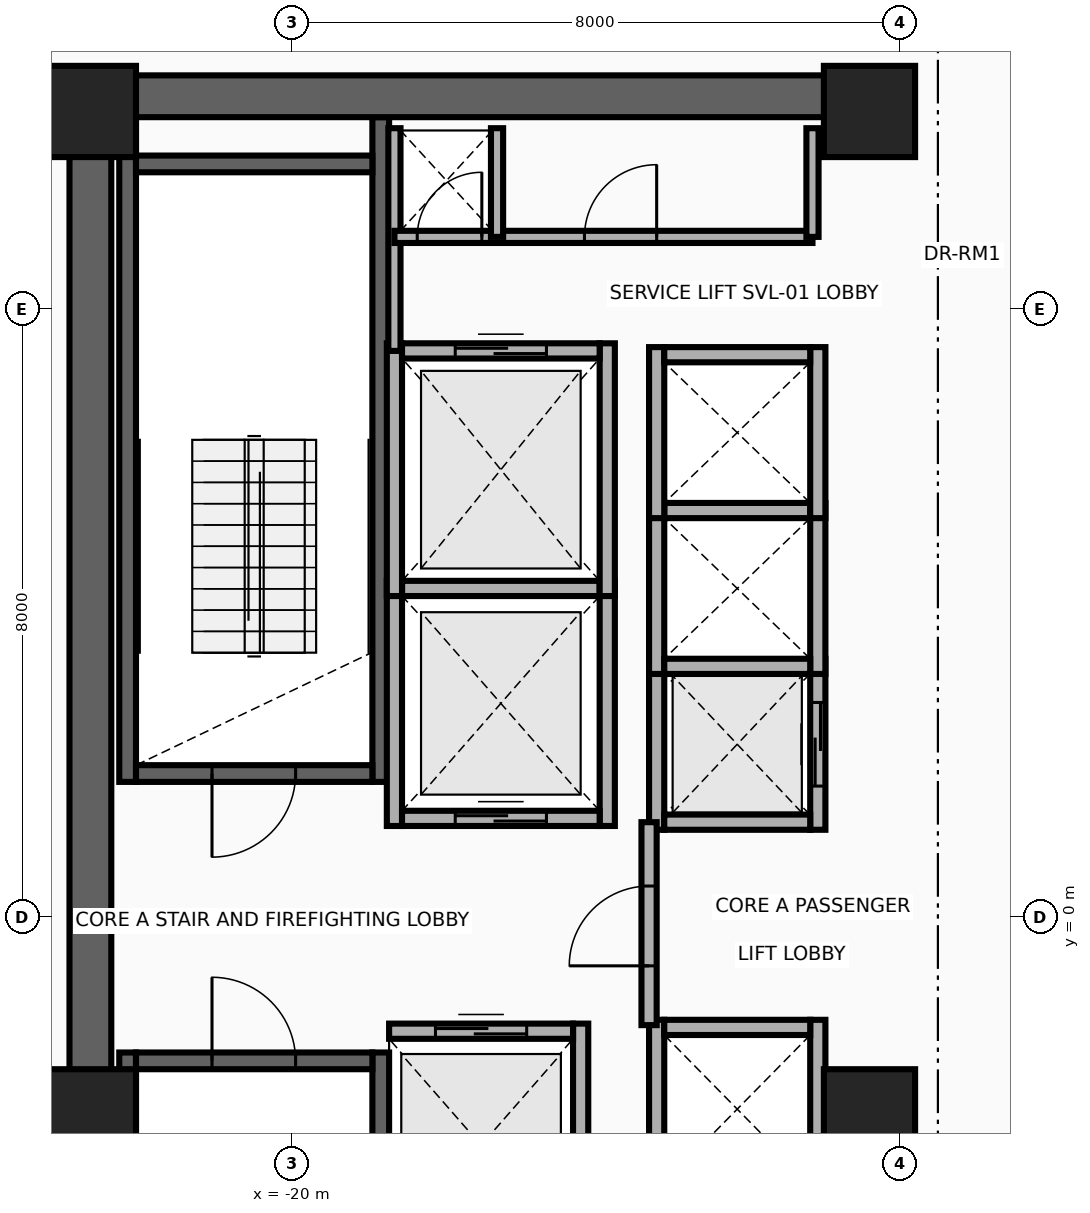
"""IFC4 building model, lengths in metres.
Left out: names, types, materials, properties, quantities, classifications, styles, units other than length and angle.
Written with IfcOpenShell. Run it as: python <this file> out.ifc"""

import sys

from ifc_helpers import new_model, si_unit, direction, frame, frame_2d, origin, origin_2d, place, context, subcontext, project, spatial, rectangle, extrude, source, transform, mapped, element, fill, save


model = new_model("IFC4")
c1 = context("Model", 3, precision=1e-05, world=origin(), true_north=direction((0.0, 1.0)))
c2 = subcontext(c1, "Body", "Model", "MODEL_VIEW")
j1 = project(units=[si_unit("LENGTHUNIT", "METRE"), si_unit("PLANEANGLEUNIT", "RADIAN")], contexts=[c1])
p1 = place(None, origin())
s1 = spatial("IfcSite", under=j1, at=p1, CompositionType="ELEMENT")
p2 = place(p1, origin())
s2 = spatial("IfcBuilding", under=s1, at=p2, CompositionType="ELEMENT")
p3 = place(p2, frame((0.0, 0.0, 157.5)))
s3 = spatial("IfcBuildingStorey", under=s2, at=p3, CompositionType="ELEMENT", Elevation=157.5)
for number, where, z_axis, x_axis in (
    (1, (-22.16, 1.78, 0.0), (0.0, 0.0, 1.0), (0.0, 1.0, 0.0)),
    (2, (-18.83, 1.78, 0.0), (0.0, 0.0, 1.0), (0.0, 1.0, 0.0)),
):
    element("IfcWall", number, at=place(p3, frame(where, z_axis=z_axis, x_axis=x_axis)), inside=s3, PredefinedType="SHEAR", context=c2, shape_type="SweptSolid", body=[
        extrude(rectangle(XDim=8.745, YDim=0.22, at=frame_2d((4.373, 0.0))), origin(), (0.0, 0.0, 1.0), 3.46),
    ])
p4 = place(p3, frame((-22.05, 1.89, 0.0), z_axis=(0.0, 0.0, 1.0), x_axis=(1.0, 0.0, 0.0)))
e3 = element("IfcWall", 3, at=p4, inside=s3, PredefinedType="SHEAR", context=c2, shape_type="SweptSolid", body=[
    extrude(rectangle(XDim=3.11, YDim=0.22, at=frame_2d((1.555, 0.0))), origin(), (0.0, 0.0, 1.0), 3.46),
])
p5 = place(p4, frame((1.0, 0.0, 0.0)))
e4 = element("IfcOpeningElement", 4, at=p5, cuts=e3, PredefinedType="OPENING", context=c2, shape_type="SweptSolid", body=[
    extrude(rectangle(XDim=1.1, YDim=2.15, at=frame_2d((0.55, 1.075))), frame((0.0, 0.125, 0.0), z_axis=(0.0, -1.0, 0.0), x_axis=(1.0, 0.0, 0.0)), (0.0, 0.0, 1.0), 0.25),
])
p6 = place(p3, frame((-22.05, 9.91, 0.0), z_axis=(0.0, 0.0, 1.0), x_axis=(1.0, 0.0, 0.0)))
e5 = element("IfcWall", 5, at=p6, inside=s3, PredefinedType="SHEAR", context=c2, shape_type="SweptSolid", body=[
    extrude(rectangle(XDim=3.11, YDim=0.22, at=frame_2d((1.555, 0.0))), origin(), (0.0, 0.0, 1.0), 3.46),
])
for number, where, z_axis, x_axis in (
    (6, (-22.16, -10.525, 0.0), (0.0, 0.0, 1.0), (0.0, 1.0, 0.0)),
    (7, (-18.83, -10.525, 0.0), (0.0, 0.0, 1.0), (0.0, 1.0, 0.0)),
):
    element("IfcWall", number, at=place(p3, frame(where, z_axis=z_axis, x_axis=x_axis)), inside=s3, PredefinedType="SHEAR", context=c2, shape_type="SweptSolid", body=[
        extrude(rectangle(XDim=8.745, YDim=0.22, at=frame_2d((4.373, 0.0))), origin(), (0.0, 0.0, 1.0), 3.46),
    ])
p7 = place(p3, frame((-22.05, -1.89, 0.0), z_axis=(0.0, 0.0, 1.0), x_axis=(1.0, 0.0, 0.0)))
e8 = element("IfcWall", 8, at=p7, inside=s3, PredefinedType="SHEAR", context=c2, shape_type="SweptSolid", body=[
    extrude(rectangle(XDim=3.11, YDim=0.22, at=frame_2d((1.555, 0.0))), origin(), (0.0, 0.0, 1.0), 3.46),
])
p8 = place(p7, frame((1.0, 0.0, 0.0)))
e9 = element("IfcOpeningElement", 9, at=p8, cuts=e8, PredefinedType="OPENING", context=c2, shape_type="SweptSolid", body=[
    extrude(rectangle(XDim=1.1, YDim=2.15, at=frame_2d((0.55, 1.075))), frame((0.0, 0.125, 0.0), z_axis=(0.0, -1.0, 0.0), x_axis=(1.0, 0.0, 0.0)), (0.0, 0.0, 1.0), 0.25),
])
p9 = place(p3, frame((-22.65, -11.075, 0.0), z_axis=(0.0, 0.0, 1.0), x_axis=(0.0, 1.0, 0.0)))
e10 = element("IfcWall", 10, at=p9, inside=s3, PredefinedType="SHEAR", context=c2, shape_type="SweptSolid", body=[
    extrude(rectangle(XDim=22.15, YDim=0.55, at=frame_2d((11.075, 0.0))), origin(), (0.0, 0.0, 1.0), 3.46),
])
p10 = place(p3, frame((-22.65, 10.8, 0.0), z_axis=(0.0, 0.0, 1.0), x_axis=(1.0, 0.0, 0.0)))
e11 = element("IfcWall", 11, at=p10, inside=s3, PredefinedType="SHEAR", context=c2, shape_type="SweptSolid", body=[
    extrude(rectangle(XDim=10.25, YDim=0.55, at=frame_2d((5.125, 0.0))), origin(), (0.0, 0.0, 1.0), 3.46),
])
m1 = source(origin(), c2, "Body", "SweptSolid", [
    extrude(rectangle(XDim=1.2, YDim=1.2, at=origin_2d()), origin(), (0.0, 0.0, 1.0), 3.7),
])
for number, where, z_axis, x_axis in (
    (12, (-22.65, -2.6, 0.0), (0.0, 0.0, 1.0), (1.0, 0.0, 0.0)),
    (13, (-12.4, -2.6, 0.0), (0.0, 0.0, 1.0), (1.0, 0.0, 0.0)),
    (14, (-22.65, 10.6, 0.0), (0.0, 0.0, 1.0), (1.0, 0.0, 0.0)),
    (15, (-12.4, 10.6, 0.0), (0.0, 0.0, 1.0), (1.0, 0.0, 0.0)),
):
    element("IfcColumn", number, at=place(p3, frame(where, z_axis=z_axis, x_axis=x_axis)), inside=s3, PredefinedType="COLUMN", context=c2, shape_type="MappedRepresentation", body=[
        mapped(m1, transform((0.0, 0.0, 0.0), x_axis=(1.0, 0.0, 0.0), y_axis=(0.0, 1.0, 0.0), z_axis=(0.0, 0.0, 1.0), scale=1.0)),
    ])
for number, where, z_axis, x_axis in (
    (16, (-18.65, 1.2, 0.0), (0.0, 0.0, 1.0), (0.0, 1.0, 0.0)),
    (17, (-15.85, 1.2, 0.0), (0.0, 0.0, 1.0), (0.0, 1.0, 0.0)),
):
    element("IfcWall", number, at=place(p3, frame(where, z_axis=z_axis, x_axis=x_axis)), inside=s3, PredefinedType="MOVABLE", context=c2, shape_type="SweptSolid", body=[
        extrude(rectangle(XDim=3.225, YDim=0.2, at=frame_2d((1.613, 0.0))), origin(), (0.0, 0.0, 1.0), 3.46),
    ])
p11 = place(p3, frame((-18.55, 1.3, 0.0), z_axis=(0.0, 0.0, 1.0), x_axis=(1.0, 0.0, 0.0)))
e18 = element("IfcWall", 18, at=p11, inside=s3, PredefinedType="MOVABLE", context=c2, shape_type="SweptSolid", body=[
    extrude(rectangle(XDim=2.6, YDim=0.2, at=frame_2d((1.3, 0.0))), origin(), (0.0, 0.0, 1.0), 3.46),
])
p12 = place(p11, frame((0.7, 0.0, 0.0)))
e19 = element("IfcOpeningElement", 19, at=p12, cuts=e18, PredefinedType="OPENING", context=c2, shape_type="SweptSolid", body=[
    extrude(rectangle(XDim=1.2, YDim=2.1, at=frame_2d((0.6, 1.05))), frame((0.0, 0.115, 0.0), z_axis=(0.0, -1.0, 0.0), x_axis=(1.0, 0.0, 0.0)), (0.0, 0.0, 1.0), 0.23),
])
p13 = place(p3, frame((-18.55, 4.325, 0.0), z_axis=(0.0, 0.0, 1.0), x_axis=(1.0, 0.0, 0.0)))
e20 = element("IfcWall", 20, at=p13, inside=s3, PredefinedType="MOVABLE", context=c2, shape_type="SweptSolid", body=[
    extrude(rectangle(XDim=2.6, YDim=0.2, at=frame_2d((1.3, 0.0))), origin(), (0.0, 0.0, 1.0), 3.46),
])
p14 = place(p3, frame((-16.2, -4.6, 0.0), z_axis=(0.0, 0.0, 1.0), x_axis=(0.0, 1.0, 0.0)))
e21 = element("IfcWall", 21, at=p14, inside=s3, PredefinedType="MOVABLE", context=c2, shape_type="SweptSolid", body=[
    extrude(rectangle(XDim=3.2, YDim=0.2, at=frame_2d((1.6, 0.0))), origin(), (0.0, 0.0, 1.0), 3.46),
])
p15 = place(p3, frame((-18.72, -1.5, 0.0), z_axis=(0.0, 0.0, 1.0), x_axis=(1.0, 0.0, 0.0)))
e22 = element("IfcWall", 22, at=p15, inside=s3, PredefinedType="MOVABLE", context=c2, shape_type="SweptSolid", body=[
    extrude(rectangle(XDim=2.42, YDim=0.2, at=frame_2d((1.21, 0.0))), origin(), (0.0, 0.0, 1.0), 3.46),
])
p16 = place(p15, frame((0.61, 0.0, 0.0)))
e23 = element("IfcOpeningElement", 23, at=p16, cuts=e22, PredefinedType="OPENING", context=c2, shape_type="SweptSolid", body=[
    extrude(rectangle(XDim=1.2, YDim=2.1, at=frame_2d((0.6, 1.05))), frame((0.0, 0.115, 0.0), z_axis=(0.0, -1.0, 0.0), x_axis=(1.0, 0.0, 0.0)), (0.0, 0.0, 1.0), 0.23),
])
for number, where, z_axis, x_axis in (
    (24, (-18.65, 4.225, 0.0), (0.0, 0.0, 1.0), (0.0, 1.0, 0.0)),
    (25, (-15.85, 4.225, 0.0), (0.0, 0.0, 1.0), (0.0, 1.0, 0.0)),
):
    element("IfcWall", number, at=place(p3, frame(where, z_axis=z_axis, x_axis=x_axis)), inside=s3, PredefinedType="MOVABLE", context=c2, shape_type="SweptSolid", body=[
        extrude(rectangle(XDim=3.325, YDim=0.2, at=frame_2d((1.663, 0.0))), origin(), (0.0, 0.0, 1.0), 3.46),
    ])
p17 = place(p3, frame((-18.55, 7.45, 0.0), z_axis=(0.0, 0.0, 1.0), x_axis=(1.0, 0.0, 0.0)))
e26 = element("IfcWall", 26, at=p17, inside=s3, PredefinedType="MOVABLE", context=c2, shape_type="SweptSolid", body=[
    extrude(rectangle(XDim=2.6, YDim=0.2, at=frame_2d((1.3, 0.0))), origin(), (0.0, 0.0, 1.0), 3.46),
])
p18 = place(p17, frame((0.7, 0.0, 0.0)))
e27 = element("IfcOpeningElement", 27, at=p18, cuts=e26, PredefinedType="OPENING", context=c2, shape_type="SweptSolid", body=[
    extrude(rectangle(XDim=1.2, YDim=2.1, at=frame_2d((0.6, 1.05))), frame((0.0, 0.115, 0.0), z_axis=(0.0, -1.0, 0.0), x_axis=(1.0, 0.0, 0.0)), (0.0, 0.0, 1.0), 0.23),
])
p19 = place(p3, frame((-15.2, 1.15, 0.0), z_axis=(0.0, 0.0, 1.0), x_axis=(0.0, 1.0, 0.0)))
e28 = element("IfcWall", 28, at=p19, inside=s3, PredefinedType="MOVABLE", context=c2, shape_type="SweptSolid", body=[
    extrude(rectangle(XDim=2.25, YDim=0.2, at=frame_2d((1.125, 0.0))), origin(), (0.0, 0.0, 1.0), 3.46),
])
p20 = place(p3, frame((-13.08, 1.15, 0.0), z_axis=(0.0, 0.0, 1.0), x_axis=(0.0, 1.0, 0.0)))
e29 = element("IfcWall", 29, at=p20, inside=s3, PredefinedType="MOVABLE", context=c2, shape_type="SweptSolid", body=[
    extrude(rectangle(XDim=2.25, YDim=0.2, at=frame_2d((1.125, 0.0))), origin(), (0.0, 0.0, 1.0), 3.46),
])
p21 = place(p20, frame((0.575, 0.0, 0.0)))
e30 = element("IfcOpeningElement", 30, at=p21, cuts=e29, PredefinedType="OPENING", context=c2, shape_type="SweptSolid", body=[
    extrude(rectangle(XDim=1.1, YDim=2.1, at=frame_2d((0.55, 1.05))), frame((0.0, 0.115, 0.0), z_axis=(0.0, -1.0, 0.0), x_axis=(1.0, 0.0, 0.0)), (0.0, 0.0, 1.0), 0.23),
])
p22 = place(p3, frame((-15.1, 1.25, 0.0), z_axis=(0.0, 0.0, 1.0), x_axis=(1.0, 0.0, 0.0)))
e31 = element("IfcWall", 31, at=p22, inside=s3, PredefinedType="MOVABLE", context=c2, shape_type="SweptSolid", body=[
    extrude(rectangle(XDim=1.92, YDim=0.2, at=frame_2d((0.96, 0.0))), origin(), (0.0, 0.0, 1.0), 3.46),
])
for number, where, z_axis, x_axis in (
    (32, (-15.2, 3.2, 0.0), (0.0, 0.0, 1.0), (0.0, 1.0, 0.0)),
    (33, (-13.08, 3.2, 0.0), (0.0, 0.0, 1.0), (0.0, 1.0, 0.0)),
):
    element("IfcWall", number, at=place(p3, frame(where, z_axis=z_axis, x_axis=x_axis)), inside=s3, PredefinedType="MOVABLE", context=c2, shape_type="SweptSolid", body=[
        extrude(rectangle(XDim=2.25, YDim=0.2, at=frame_2d((1.125, 0.0))), origin(), (0.0, 0.0, 1.0), 3.46),
    ])
for number, where, z_axis, x_axis in (
    (34, (-15.1, 3.3, 0.0), (0.0, 0.0, 1.0), (1.0, 0.0, 0.0)),
    (35, (-15.1, 5.35, 0.0), (0.0, 0.0, 1.0), (1.0, 0.0, 0.0)),
):
    element("IfcWall", number, at=place(p3, frame(where, z_axis=z_axis, x_axis=x_axis)), inside=s3, PredefinedType="MOVABLE", context=c2, shape_type="SweptSolid", body=[
        extrude(rectangle(XDim=1.92, YDim=0.2, at=frame_2d((0.96, 0.0))), origin(), (0.0, 0.0, 1.0), 3.46),
    ])
for number, where, z_axis, x_axis in (
    (36, (-15.2, 5.25, 0.0), (0.0, 0.0, 1.0), (0.0, 1.0, 0.0)),
    (37, (-13.08, 5.25, 0.0), (0.0, 0.0, 1.0), (0.0, 1.0, 0.0)),
):
    element("IfcWall", number, at=place(p3, frame(where, z_axis=z_axis, x_axis=x_axis)), inside=s3, PredefinedType="MOVABLE", context=c2, shape_type="SweptSolid", body=[
        extrude(rectangle(XDim=2.25, YDim=0.2, at=frame_2d((1.125, 0.0))), origin(), (0.0, 0.0, 1.0), 3.46),
    ])
p23 = place(p3, frame((-15.1, 7.4, 0.0), z_axis=(0.0, 0.0, 1.0), x_axis=(1.0, 0.0, 0.0)))
e38 = element("IfcWall", 38, at=p23, inside=s3, PredefinedType="MOVABLE", context=c2, shape_type="SweptSolid", body=[
    extrude(rectangle(XDim=1.92, YDim=0.2, at=frame_2d((0.96, 0.0))), origin(), (0.0, 0.0, 1.0), 3.46),
])
for number, where, z_axis, x_axis in (
    (39, (-15.2, -3.7, 0.0), (0.0, 0.0, 1.0), (0.0, 1.0, 0.0)),
    (40, (-13.08, -3.7, 0.0), (0.0, 0.0, 1.0), (0.0, 1.0, 0.0)),
):
    element("IfcWall", number, at=place(p3, frame(where, z_axis=z_axis, x_axis=x_axis)), inside=s3, PredefinedType="MOVABLE", context=c2, shape_type="SweptSolid", body=[
        extrude(rectangle(XDim=2.35, YDim=0.2, at=frame_2d((1.175, 0.0))), origin(), (0.0, 0.0, 1.0), 3.46),
    ])
p24 = place(p3, frame((-15.1, -1.45, 0.0), z_axis=(0.0, 0.0, 1.0), x_axis=(1.0, 0.0, 0.0)))
e41 = element("IfcWall", 41, at=p24, inside=s3, PredefinedType="MOVABLE", context=c2, shape_type="SweptSolid", body=[
    extrude(rectangle(XDim=1.92, YDim=0.2, at=frame_2d((0.96, 0.0))), origin(), (0.0, 0.0, 1.0), 3.46),
])
p25 = place(p3, frame((-15.3, -1.42, 0.0), z_axis=(0.0, 0.0, 1.0), x_axis=(0.0, 1.0, 0.0)))
e42 = element("IfcWall", 42, at=p25, inside=s3, PredefinedType="PARTITIONING", context=c2, shape_type="SweptSolid", body=[
    extrude(rectangle(XDim=2.67, YDim=0.2, at=frame_2d((1.335, 0.0))), origin(), (0.0, 0.0, 1.0), 3.46),
])
p26 = place(p25, frame((0.78, 0.0, 0.0)))
e43 = element("IfcOpeningElement", 43, at=p26, cuts=e42, PredefinedType="OPENING", context=c2, shape_type="SweptSolid", body=[
    extrude(rectangle(XDim=1.05, YDim=2.15, at=frame_2d((0.525, 1.075))), frame((0.0, 0.115, 0.0), z_axis=(0.0, -1.0, 0.0), x_axis=(1.0, 0.0, 0.0)), (0.0, 0.0, 1.0), 0.23),
])
p27 = place(p3, frame((-18.65, 7.45, 0.0), z_axis=(0.0, 0.0, 1.0), x_axis=(0.0, 1.0, 0.0)))
e44 = element("IfcWall", 44, at=p27, inside=s3, PredefinedType="PARTITIONING", context=c2, shape_type="SweptSolid", body=[
    extrude(rectangle(XDim=2.93, YDim=0.16, at=frame_2d((1.465, 0.0))), origin(), (0.0, 0.0, 1.0), 3.46),
])
p28 = place(p3, frame((-18.65, 8.95, 0.0), z_axis=(0.0, 0.0, 1.0), x_axis=(1.0, 0.0, 0.0)))
e45 = element("IfcWall", 45, at=p28, inside=s3, PredefinedType="PARTITIONING", context=c2, shape_type="SweptSolid", body=[
    extrude(rectangle(XDim=5.5, YDim=0.16, at=frame_2d((2.75, 0.0))), origin(), (0.0, 0.0, 1.0), 3.46),
])
p29 = place(p28, frame((0.3, 0.0, 0.0)))
e46 = element("IfcOpeningElement", 46, at=p29, cuts=e45, PredefinedType="OPENING", context=c2, shape_type="SweptSolid", body=[
    extrude(rectangle(XDim=0.85, YDim=2.05, at=frame_2d((0.425, 1.025))), frame((0.0, 0.095, 0.0), z_axis=(0.0, -1.0, 0.0), x_axis=(1.0, 0.0, 0.0)), (0.0, 0.0, 1.0), 0.19),
])
p30 = place(p28, frame((2.5, 0.0, 0.0)))
e47 = element("IfcOpeningElement", 47, at=p30, cuts=e45, PredefinedType="OPENING", context=c2, shape_type="SweptSolid", body=[
    extrude(rectangle(XDim=0.95, YDim=2.15, at=frame_2d((0.475, 1.075))), frame((0.0, 0.095, 0.0), z_axis=(0.0, -1.0, 0.0), x_axis=(1.0, 0.0, 0.0)), (0.0, 0.0, 1.0), 0.19),
])
for number, where, z_axis, x_axis in (
    (48, (-13.15, 8.95, 0.0), (0.0, 0.0, 1.0), (0.0, 1.0, 0.0)),
    (49, (-17.3, 8.95, 0.0), (0.0, 0.0, 1.0), (0.0, 1.0, 0.0)),
):
    element("IfcWall", number, at=place(p3, frame(where, z_axis=z_axis, x_axis=x_axis)), inside=s3, PredefinedType="PARTITIONING", context=c2, shape_type="SweptSolid", body=[
        extrude(rectangle(XDim=1.43, YDim=0.16, at=frame_2d((0.715, 0.0))), origin(), (0.0, 0.0, 1.0), 3.46),
    ])
p31 = place(p12, origin())
e50 = element("IfcDoor", 50, at=p31, inside=s3, OperationType="DOUBLE_DOOR_SLIDING", PredefinedType="DOOR", context=c2, shape_type="SweptSolid", body=[
    extrude(rectangle(XDim=1.2, YDim=2.1, at=frame_2d((0.6, 1.05))), frame((0.0, 0.025, 0.0), z_axis=(0.0, -1.0, 0.0), x_axis=(1.0, 0.0, 0.0)), (0.0, 0.0, 1.0), 0.05),
])
fill(e19, e50)
p32 = place(p16, origin())
e51 = element("IfcDoor", 51, at=p32, inside=s3, OperationType="DOUBLE_DOOR_SLIDING", PredefinedType="DOOR", context=c2, shape_type="SweptSolid", body=[
    extrude(rectangle(XDim=1.2, YDim=2.1, at=frame_2d((0.6, 1.05))), frame((0.0, 0.025, 0.0), z_axis=(0.0, -1.0, 0.0), x_axis=(1.0, 0.0, 0.0)), (0.0, 0.0, 1.0), 0.05),
])
fill(e23, e51)
p33 = place(p18, origin())
e52 = element("IfcDoor", 52, at=p33, inside=s3, OperationType="DOUBLE_DOOR_SLIDING", PredefinedType="DOOR", context=c2, shape_type="SweptSolid", body=[
    extrude(rectangle(XDim=1.2, YDim=2.1, at=frame_2d((0.6, 1.05))), frame((0.0, 0.025, 0.0), z_axis=(0.0, -1.0, 0.0), x_axis=(1.0, 0.0, 0.0)), (0.0, 0.0, 1.0), 0.05),
])
fill(e27, e52)
p34 = place(p21, origin())
e53 = element("IfcDoor", 53, at=p34, inside=s3, OperationType="DOUBLE_DOOR_SLIDING", PredefinedType="DOOR", context=c2, shape_type="SweptSolid", body=[
    extrude(rectangle(XDim=1.1, YDim=2.1, at=frame_2d((0.55, 1.05))), frame((0.0, 0.025, 0.0), z_axis=(0.0, -1.0, 0.0), x_axis=(1.0, 0.0, 0.0)), (0.0, 0.0, 1.0), 0.05),
])
fill(e30, e53)
p35 = place(p26, origin())
e54 = element("IfcDoor", 54, at=p35, inside=s3, OperationType="SINGLE_SWING_RIGHT", PredefinedType="DOOR", context=c2, shape_type="SweptSolid", body=[
    extrude(rectangle(XDim=1.05, YDim=2.15, at=frame_2d((0.525, 1.075))), frame((0.0, 0.025, 0.0), z_axis=(0.0, -1.0, 0.0), x_axis=(1.0, 0.0, 0.0)), (0.0, 0.0, 1.0), 0.05),
])
fill(e43, e54)
p36 = place(p5, frame((1.1, 0.0, 0.0), z_axis=(0.0, 0.0, 1.0), x_axis=(-1.0, 0.0, 0.0)))
e55 = element("IfcDoor", 55, at=p36, inside=s3, OperationType="SINGLE_SWING_LEFT", PredefinedType="DOOR", context=c2, shape_type="SweptSolid", body=[
    extrude(rectangle(XDim=1.1, YDim=2.15, at=frame_2d((0.55, 1.075))), frame((0.0, 0.025, 0.0), z_axis=(0.0, -1.0, 0.0), x_axis=(1.0, 0.0, 0.0)), (0.0, 0.0, 1.0), 0.05),
])
fill(e4, e55)
p37 = place(p8, origin())
e56 = element("IfcDoor", 56, at=p37, inside=s3, OperationType="SINGLE_SWING_RIGHT", PredefinedType="DOOR", context=c2, shape_type="SweptSolid", body=[
    extrude(rectangle(XDim=1.1, YDim=2.15, at=frame_2d((0.55, 1.075))), frame((0.0, 0.025, 0.0), z_axis=(0.0, -1.0, 0.0), x_axis=(1.0, 0.0, 0.0)), (0.0, 0.0, 1.0), 0.05),
])
fill(e9, e56)
p38 = place(p29, origin())
e57 = element("IfcDoor", 57, at=p38, inside=s3, OperationType="SINGLE_SWING_LEFT", PredefinedType="DOOR", context=c2, shape_type="SweptSolid", body=[
    extrude(rectangle(XDim=0.85, YDim=2.05, at=frame_2d((0.425, 1.025))), frame((0.0, 0.025, 0.0), z_axis=(0.0, -1.0, 0.0), x_axis=(1.0, 0.0, 0.0)), (0.0, 0.0, 1.0), 0.05),
])
fill(e46, e57)
p39 = place(p30, origin())
e58 = element("IfcDoor", 58, at=p39, inside=s3, OperationType="SINGLE_SWING_RIGHT", PredefinedType="DOOR", context=c2, shape_type="SweptSolid", body=[
    extrude(rectangle(XDim=0.95, YDim=2.15, at=frame_2d((0.475, 1.075))), frame((0.0, 0.025, 0.0), z_axis=(0.0, -1.0, 0.0), x_axis=(1.0, 0.0, 0.0)), (0.0, 0.0, 1.0), 0.05),
])
fill(e47, e58)
save(model, sys.argv[1])
